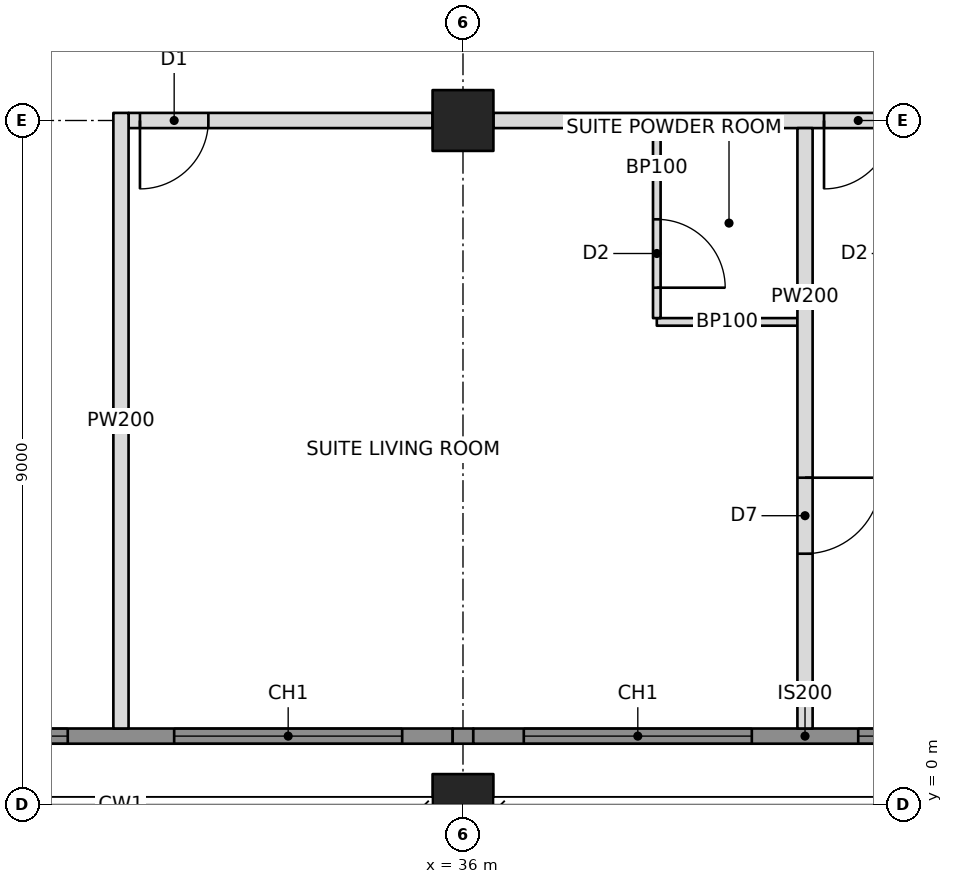
"""IFC4 building model, lengths in metres.
Left out: names, types, materials, properties, quantities, classifications, styles, units other than length and angle.
Written with IfcOpenShell. Run it as: python <this file> out.ifc"""

import sys

from ifc_helpers import new_model, si_unit, direction, frame, frame_2d, origin, origin_2d, place, context, subcontext, project, spatial, rectangle, hollow_rectangle, extrude, element, fill, save


model = new_model("IFC4")
c1 = context("Model", 3, precision=1e-05, world=origin(), true_north=direction((0.0, 1.0)))
c2 = subcontext(c1, "Body", "Model", "MODEL_VIEW")
j1 = project(units=[si_unit("LENGTHUNIT", "METRE"), si_unit("PLANEANGLEUNIT", "RADIAN")], contexts=[c1])
p1 = place(None, origin())
s1 = spatial("IfcSite", under=j1, at=p1, CompositionType="ELEMENT")
p2 = place(p1, origin())
s2 = spatial("IfcBuilding", under=s1, at=p2, CompositionType="ELEMENT")
p3 = place(p2, frame((0.0, 0.0, 51.8)))
s3 = spatial("IfcBuildingStorey", under=s2, at=p3, CompositionType="ELEMENT", Elevation=51.8)
for number, where, z_axis, x_axis in (
    (1, (36.0, 0.0, 0.0), (0.0, 0.0, 1.0), (1.0, 0.0, 0.0)),
    (2, (36.0, 9.0, 0.0), (0.0, 0.0, 1.0), (0.0, 1.0, 0.0)),
):
    element("IfcColumn", number, at=place(p3, frame(where, z_axis=z_axis, x_axis=x_axis)), inside=s3, PredefinedType="COLUMN", context=c2, shape_type="SweptSolid", body=[
        extrude(hollow_rectangle(XDim=0.8, YDim=0.8, WallThickness=0.1, at=origin_2d()), origin(), (0.0, 0.0, 1.0), 3.4),
    ])
p4 = place(p3, frame((31.6, 9.0, 0.0), z_axis=(0.0, 0.0, 1.0), x_axis=(1.0, 0.0, 0.0)))
e3 = element("IfcWall", 3, at=p4, inside=s3, PredefinedType="PARTITIONING", context=c2, shape_type="SweptSolid", body=[
    extrude(rectangle(XDim=4.0, YDim=0.2, at=frame_2d((2.0, 0.0))), origin(), (0.0, 0.0, 1.0), 2.405),
])
p5 = place(p4, frame((0.15, 0.0, 0.0)))
e4 = element("IfcOpeningElement", 4, at=p5, cuts=e3, PredefinedType="OPENING", context=c2, shape_type="SweptSolid", body=[
    extrude(rectangle(XDim=0.9, YDim=2.1, at=frame_2d((0.45, 1.05))), frame((0.0, 0.11, 0.0), z_axis=(0.0, -1.0, 0.0), x_axis=(1.0, 0.0, 0.0)), (0.0, 0.0, 1.0), 0.22),
])
p6 = place(p3, frame((36.4, 9.0, 0.0), z_axis=(0.0, 0.0, 1.0), x_axis=(1.0, 0.0, 0.0)))
e5 = element("IfcWall", 5, at=p6, inside=s3, PredefinedType="PARTITIONING", context=c2, shape_type="SweptSolid", body=[
    extrude(rectangle(XDim=8.2, YDim=0.2, at=frame_2d((4.1, 0.0))), origin(), (0.0, 0.0, 1.0), 2.438),
])
p7 = place(p6, frame((4.35, 0.0, 0.0)))
e6 = element("IfcOpeningElement", 6, at=p7, cuts=e5, PredefinedType="OPENING", context=c2, shape_type="SweptSolid", body=[
    extrude(rectangle(XDim=0.9, YDim=2.1, at=frame_2d((0.45, 1.05))), frame((0.0, 0.11, 0.0), z_axis=(0.0, -1.0, 0.0), x_axis=(1.0, 0.0, 0.0)), (0.0, 0.0, 1.0), 0.22),
])
p8 = place(p3, frame((31.5, 9.1, 0.0), z_axis=(0.0, 0.0, 1.0), x_axis=(0.0, -1.0, 0.0)))
e7 = element("IfcWall", 7, at=p8, inside=s3, PredefinedType="PARTITIONING", context=c2, shape_type="SweptSolid", body=[
    extrude(rectangle(XDim=8.1, YDim=0.2, at=frame_2d((4.05, 0.0))), origin(), (0.0, 0.0, 1.0), 2.404),
])
p9 = place(p3, frame((40.5, 8.9, 0.0), z_axis=(0.0, 0.0, 1.0), x_axis=(0.0, -1.0, 0.0)))
e8 = element("IfcWall", 8, at=p9, inside=s3, PredefinedType="PARTITIONING", context=c2, shape_type="SweptSolid", body=[
    extrude(rectangle(XDim=7.9, YDim=0.2, at=frame_2d((3.95, 0.0))), origin(), (0.0, 0.0, 1.0), 2.438),
])
p10 = place(p9, frame((4.6, 0.0, 0.0)))
e9 = element("IfcOpeningElement", 9, at=p10, cuts=e8, PredefinedType="OPENING", context=c2, shape_type="SweptSolid", body=[
    extrude(rectangle(XDim=1.0, YDim=2.1, at=frame_2d((0.5, 1.05))), frame((0.0, 0.11, 0.0), z_axis=(0.0, -1.0, 0.0), x_axis=(1.0, 0.0, 0.0)), (0.0, 0.0, 1.0), 0.22),
])
p11 = place(p3, frame((38.55, 6.35, 0.0), z_axis=(0.0, 0.0, 1.0), x_axis=(1.0, 0.0, 0.0)))
e10 = element("IfcWall", 10, at=p11, inside=s3, PredefinedType="PARTITIONING", context=c2, shape_type="SweptSolid", body=[
    extrude(rectangle(XDim=1.85, YDim=0.1, at=frame_2d((0.925, 0.0))), origin(), (0.0, 0.0, 1.0), 3.2),
])
p12 = place(p3, frame((38.55, 8.9, 0.0), z_axis=(0.0, 0.0, 1.0), x_axis=(0.0, -1.0, 0.0)))
e11 = element("IfcWall", 11, at=p12, inside=s3, PredefinedType="PARTITIONING", context=c2, shape_type="SweptSolid", body=[
    extrude(rectangle(XDim=2.5, YDim=0.1, at=frame_2d((1.25, 0.0))), origin(), (0.0, 0.0, 1.0), 2.438),
])
p13 = place(p12, frame((1.2, 0.0, 0.0)))
e12 = element("IfcOpeningElement", 12, at=p13, cuts=e11, PredefinedType="OPENING", context=c2, shape_type="SweptSolid", body=[
    extrude(rectangle(XDim=0.9, YDim=2.1, at=frame_2d((0.45, 1.05))), frame((0.0, 0.06, 0.0), z_axis=(0.0, -1.0, 0.0), x_axis=(1.0, 0.0, 0.0)), (0.0, 0.0, 1.0), 0.12),
])
p14 = place(p3, frame((27.194, 0.9, 0.0), z_axis=(0.0, 0.0, 1.0), x_axis=(1.0, 0.0, 0.0)))
e13 = element("IfcWall", 13, at=p14, inside=s3, PredefinedType="SOLIDWALL", context=c2, shape_type="SweptSolid", body=[
    extrude(rectangle(XDim=8.671, YDim=0.2, at=frame_2d((4.335, 0.0))), origin(), (0.0, 0.0, 1.0), 3.2),
])
p15 = place(p14, frame((0.606, 0.0, 0.6)))
e14 = element("IfcOpeningElement", 14, at=p15, cuts=e13, PredefinedType="OPENING", context=c2, shape_type="SweptSolid", body=[
    extrude(rectangle(XDim=3.0, YDim=2.2, at=frame_2d((1.5, 1.1))), frame((0.0, 0.11, 0.0), z_axis=(0.0, -1.0, 0.0), x_axis=(1.0, 0.0, 0.0)), (0.0, 0.0, 1.0), 0.22),
])
p16 = place(p14, frame((5.006, 0.0, 0.6)))
e15 = element("IfcOpeningElement", 15, at=p16, cuts=e13, PredefinedType="OPENING", context=c2, shape_type="SweptSolid", body=[
    extrude(rectangle(XDim=3.0, YDim=2.2, at=frame_2d((1.5, 1.1))), frame((0.0, 0.11, 0.0), z_axis=(0.0, -1.0, 0.0), x_axis=(1.0, 0.0, 0.0)), (0.0, 0.0, 1.0), 0.22),
])
p17 = place(p3, frame((35.865, 0.9, 0.0), z_axis=(0.0, 0.0, 1.0), x_axis=(1.0, 0.0, 0.0)))
e16 = element("IfcWall", 16, at=p17, inside=s3, PredefinedType="SOLIDWALL", context=c2, shape_type="SweptSolid", body=[
    extrude(rectangle(XDim=0.271, YDim=0.2, at=frame_2d((0.135, 0.0))), origin(), (0.0, 0.0, 1.0), 2.438),
])
p18 = place(p3, frame((36.135, 0.9, 0.0), z_axis=(0.0, 0.0, 1.0), x_axis=(1.0, 0.0, 0.0)))
e17 = element("IfcWall", 17, at=p18, inside=s3, PredefinedType="SOLIDWALL", context=c2, shape_type="SweptSolid", body=[
    extrude(rectangle(XDim=8.729, YDim=0.2, at=frame_2d((4.365, 0.0))), origin(), (0.0, 0.0, 1.0), 3.2),
])
p19 = place(p18, frame((0.665, 0.0, 0.6)))
e18 = element("IfcOpeningElement", 18, at=p19, cuts=e17, PredefinedType="OPENING", context=c2, shape_type="SweptSolid", body=[
    extrude(rectangle(XDim=3.0, YDim=2.2, at=frame_2d((1.5, 1.1))), frame((0.0, 0.11, 0.0), z_axis=(0.0, -1.0, 0.0), x_axis=(1.0, 0.0, 0.0)), (0.0, 0.0, 1.0), 0.22),
])
p20 = place(p18, frame((5.065, 0.0, 0.6)))
e19 = element("IfcOpeningElement", 19, at=p20, cuts=e17, PredefinedType="OPENING", context=c2, shape_type="SweptSolid", body=[
    extrude(rectangle(XDim=3.0, YDim=2.2, at=frame_2d((1.5, 1.1))), frame((0.0, 0.11, 0.0), z_axis=(0.0, -1.0, 0.0), x_axis=(1.0, 0.0, 0.0)), (0.0, 0.0, 1.0), 0.22),
])
p21 = place(p15, origin())
e20 = element("IfcWindow", 20, at=p21, inside=s3, PartitioningType="TRIPLE_PANEL_VERTICAL", PredefinedType="WINDOW", context=c2, shape_type="SweptSolid", body=[
    extrude(rectangle(XDim=3.0, YDim=2.2, at=frame_2d((1.5, 1.1))), frame((0.0, 0.03, 0.0), z_axis=(0.0, -1.0, 0.0), x_axis=(1.0, 0.0, 0.0)), (0.0, 0.0, 1.0), 0.06),
])
fill(e14, e20)
p22 = place(p16, origin())
e21 = element("IfcWindow", 21, at=p22, inside=s3, PartitioningType="TRIPLE_PANEL_VERTICAL", PredefinedType="WINDOW", context=c2, shape_type="SweptSolid", body=[
    extrude(rectangle(XDim=3.0, YDim=2.2, at=frame_2d((1.5, 1.1))), frame((0.0, 0.03, 0.0), z_axis=(0.0, -1.0, 0.0), x_axis=(1.0, 0.0, 0.0)), (0.0, 0.0, 1.0), 0.06),
])
fill(e15, e21)
p23 = place(p19, origin())
e22 = element("IfcWindow", 22, at=p23, inside=s3, PartitioningType="TRIPLE_PANEL_VERTICAL", PredefinedType="WINDOW", context=c2, shape_type="SweptSolid", body=[
    extrude(rectangle(XDim=3.0, YDim=2.2, at=frame_2d((1.5, 1.1))), frame((0.0, 0.03, 0.0), z_axis=(0.0, -1.0, 0.0), x_axis=(1.0, 0.0, 0.0)), (0.0, 0.0, 1.0), 0.06),
])
fill(e18, e22)
p24 = place(p20, origin())
e23 = element("IfcWindow", 23, at=p24, inside=s3, PartitioningType="TRIPLE_PANEL_VERTICAL", PredefinedType="WINDOW", context=c2, shape_type="SweptSolid", body=[
    extrude(rectangle(XDim=3.0, YDim=2.2, at=frame_2d((1.5, 1.1))), frame((0.0, 0.03, 0.0), z_axis=(0.0, -1.0, 0.0), x_axis=(1.0, 0.0, 0.0)), (0.0, 0.0, 1.0), 0.06),
])
fill(e19, e23)
p25 = place(p10, origin())
e24 = element("IfcDoor", 24, at=p25, inside=s3, OperationType="SINGLE_SWING_LEFT", PredefinedType="DOOR", context=c2, shape_type="SweptSolid", body=[
    extrude(rectangle(XDim=1.0, YDim=2.1, at=frame_2d((0.5, 1.05))), frame((0.0, 0.025, 0.0), z_axis=(0.0, -1.0, 0.0), x_axis=(1.0, 0.0, 0.0)), (0.0, 0.0, 1.0), 0.05),
])
fill(e9, e24)
p26 = place(p13, origin())
e25 = element("IfcDoor", 25, at=p26, inside=s3, OperationType="SINGLE_SWING_RIGHT", PredefinedType="DOOR", context=c2, shape_type="SweptSolid", body=[
    extrude(rectangle(XDim=0.9, YDim=2.1, at=frame_2d((0.45, 1.05))), frame((0.0, 0.025, 0.0), z_axis=(0.0, -1.0, 0.0), x_axis=(1.0, 0.0, 0.0)), (0.0, 0.0, 1.0), 0.05),
])
fill(e12, e25)
p27 = place(p5, frame((0.9, 0.0, 0.0), z_axis=(0.0, 0.0, 1.0), x_axis=(-1.0, 0.0, 0.0)))
e26 = element("IfcDoor", 26, at=p27, inside=s3, OperationType="SINGLE_SWING_RIGHT", PredefinedType="DOOR", context=c2, shape_type="SweptSolid", body=[
    extrude(rectangle(XDim=0.9, YDim=2.1, at=frame_2d((0.45, 1.05))), frame((0.0, 0.025, 0.0), z_axis=(0.0, -1.0, 0.0), x_axis=(1.0, 0.0, 0.0)), (0.0, 0.0, 1.0), 0.05),
])
fill(e4, e26)
p28 = place(p7, frame((0.9, 0.0, 0.0), z_axis=(0.0, 0.0, 1.0), x_axis=(-1.0, 0.0, 0.0)))
e27 = element("IfcDoor", 27, at=p28, inside=s3, OperationType="SINGLE_SWING_RIGHT", PredefinedType="DOOR", context=c2, shape_type="SweptSolid", body=[
    extrude(rectangle(XDim=0.9, YDim=2.1, at=frame_2d((0.45, 1.05))), frame((0.0, 0.025, 0.0), z_axis=(0.0, -1.0, 0.0), x_axis=(1.0, 0.0, 0.0)), (0.0, 0.0, 1.0), 0.05),
])
fill(e6, e27)
save(model, sys.argv[1])
